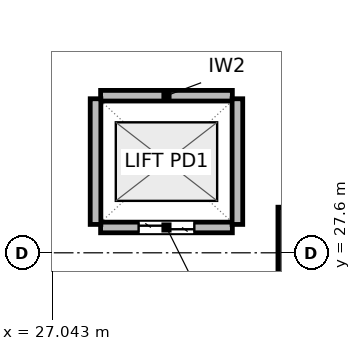
"""IFC4 building model, lengths in metres.
Left out: names, types, materials, properties, quantities, classifications, styles, units other than length and angle.
Written with IfcOpenShell. Run it as: python <this file> out.ifc"""

import sys

from ifc_helpers import new_model, si_unit, direction, frame, frame_2d, origin, origin_2d, place, context, subcontext, project, spatial, rectangle, extrude, element, fill, save


model = new_model("IFC4")
c1 = context("Model", 3, precision=1e-05, world=origin(), true_north=direction((0.0, 1.0)))
c2 = subcontext(c1, "Body", "Model", "MODEL_VIEW")
j1 = project(units=[si_unit("LENGTHUNIT", "METRE"), si_unit("PLANEANGLEUNIT", "RADIAN")], contexts=[c1])
p1 = place(None, origin())
s1 = spatial("IfcSite", under=j1, at=p1, CompositionType="ELEMENT")
p2 = place(p1, origin())
s2 = spatial("IfcBuilding", under=s1, at=p2, CompositionType="ELEMENT")
p3 = place(p2, frame((0.0, 0.0, 17.1)))
s3 = spatial("IfcBuildingStorey", under=s2, at=p3, CompositionType="ELEMENT", Elevation=17.1)
p4 = place(p3, frame((32.4, 27.6, 0.0), z_axis=(0.0, 0.0, 1.0), x_axis=(1.0, 0.0, 0.0)))
e1 = element("IfcColumn", 1, at=p4, inside=s3, PredefinedType="COLUMN", context=c2, shape_type="SweptSolid", body=[
    extrude(rectangle(XDim=1.8, YDim=1.8, at=origin_2d()), origin(), (0.0, 0.0, 1.0), 4.5),
])
p5 = place(p3, frame((28.0, 28.1, 0.0), z_axis=(0.0, 0.0, 1.0), x_axis=(1.0, 0.0, 0.0)))
e2 = element("IfcWall", 2, at=p5, inside=s3, PredefinedType="PARTITIONING", context=c2, shape_type="SweptSolid", body=[
    extrude(rectangle(XDim=2.6, YDim=0.21, at=frame_2d((1.3, 0.0))), origin(), (0.0, 0.0, 1.0), 2.775),
])
p6 = place(p5, frame((0.75, 0.0, 0.0)))
e3 = element("IfcOpeningElement", 3, at=p6, cuts=e2, PredefinedType="OPENING", context=c2, shape_type="SweptSolid", body=[
    extrude(rectangle(XDim=1.1, YDim=2.04, at=frame_2d((0.55, 1.02))), frame((0.0, 0.115, 0.0), z_axis=(0.0, -1.0, 0.0), x_axis=(1.0, 0.0, 0.0)), (0.0, 0.0, 1.0), 0.23),
])
p7 = place(p3, frame((28.0, 30.7, 0.0), z_axis=(0.0, 0.0, 1.0), x_axis=(1.0, 0.0, 0.0)))
e4 = element("IfcWall", 4, at=p7, inside=s3, PredefinedType="PARTITIONING", context=c2, shape_type="SweptSolid", body=[
    extrude(rectangle(XDim=2.6, YDim=0.21, at=frame_2d((1.3, 0.0))), origin(), (0.0, 0.0, 1.0), 4.24),
])
for number, where, z_axis, x_axis in (
    (5, (27.9, 28.16, 0.0), (0.0, 0.0, 1.0), (0.0, 1.0, 0.0)),
    (6, (30.7, 28.16, 0.0), (0.0, 0.0, 1.0), (0.0, 1.0, 0.0)),
):
    element("IfcWall", number, at=place(p3, frame(where, z_axis=z_axis, x_axis=x_axis)), inside=s3, PredefinedType="PARTITIONING", context=c2, shape_type="SweptSolid", body=[
        extrude(rectangle(XDim=2.48, YDim=0.21, at=frame_2d((1.24, 0.0))), origin(), (0.0, 0.0, 1.0), 4.24),
    ])
p8 = place(p6, origin())
e7 = element("IfcDoor", 7, at=p8, inside=s3, OperationType="DOUBLE_DOOR_SLIDING", PredefinedType="DOOR", context=c2, shape_type="SweptSolid", body=[
    extrude(rectangle(XDim=1.1, YDim=2.04, at=frame_2d((0.55, 1.02))), frame((0.0, 0.025, 0.0), z_axis=(0.0, -1.0, 0.0), x_axis=(1.0, 0.0, 0.0)), (0.0, 0.0, 1.0), 0.05),
])
fill(e3, e7)
save(model, sys.argv[1])
